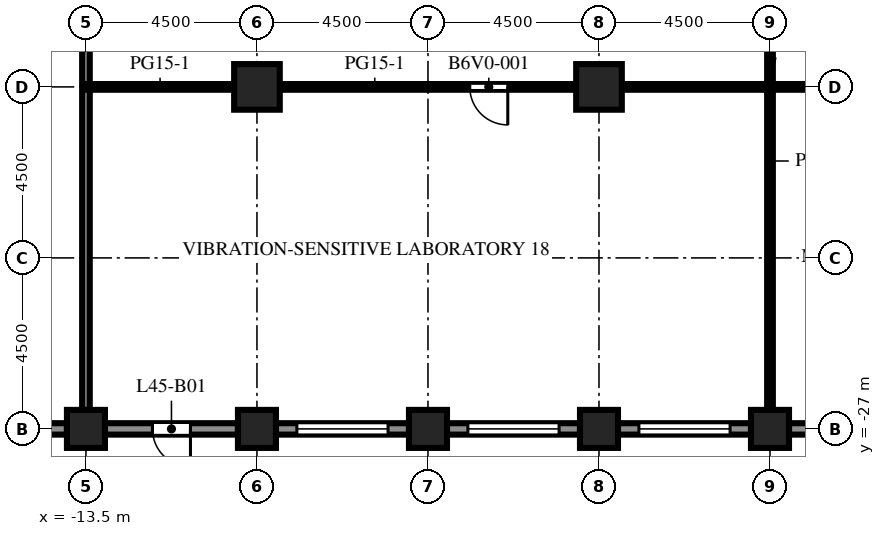
"""IFC4 building model, lengths in metres.
Left out: names, types, materials, properties, quantities, classifications, styles, units other than length and angle.
Written with IfcOpenShell. Run it as: python <this file> out.ifc"""

import sys

from ifc_helpers import new_model, si_unit, direction, frame, frame_2d, origin, origin_2d, place, context, subcontext, project, spatial, rectangle, extrude, element, fill, save


model = new_model("IFC4")
c1 = context("Model", 3, precision=1e-05, world=origin(), true_north=direction((0.0, 1.0)))
c2 = subcontext(c1, "Body", "Model", "MODEL_VIEW")
j1 = project(units=[si_unit("LENGTHUNIT", "METRE"), si_unit("PLANEANGLEUNIT", "RADIAN")], contexts=[c1])
p1 = place(None, origin())
s1 = spatial("IfcSite", under=j1, at=p1, CompositionType="ELEMENT")
p2 = place(p1, origin())
s2 = spatial("IfcBuilding", under=s1, at=p2, CompositionType="ELEMENT")
p3 = place(p2, frame((0.0, 0.0, 199.7)))
s3 = spatial("IfcBuildingStorey", under=s2, at=p3, CompositionType="ELEMENT", Elevation=199.7)
for number, where, z_axis, x_axis in (
    (1, (-13.5, -27.0, 0.0), (0.0, 0.0, 1.0), (1.0, 0.0, 0.0)),
    (2, (-9.0, -27.0, 0.0), (0.0, 0.0, 1.0), (1.0, 0.0, 0.0)),
    (3, (-4.5, -27.0, 0.0), (0.0, 0.0, 1.0), (1.0, 0.0, 0.0)),
    (4, (0.0, -27.0, 0.0), (0.0, 0.0, 1.0), (1.0, 0.0, 0.0)),
    (5, (4.5, -27.0, 0.0), (0.0, 0.0, 1.0), (1.0, 0.0, 0.0)),
):
    element("IfcColumn", number, at=place(p3, frame(where, z_axis=z_axis, x_axis=x_axis)), inside=s3, PredefinedType="COLUMN", context=c2, shape_type="SweptSolid", body=[
        extrude(rectangle(XDim=1.0, YDim=1.0, at=origin_2d()), origin(), (0.0, 0.0, 1.0), 4.1),
    ])
for number, where, z_axis, x_axis in (
    (6, (-9.0, -18.0, 0.0), (0.0, 0.0, 1.0), (1.0, 0.0, 0.0)),
    (7, (0.0, -18.0, 0.0), (0.0, 0.0, 1.0), (1.0, 0.0, 0.0)),
):
    element("IfcColumn", number, at=place(p3, frame(where, z_axis=z_axis, x_axis=x_axis)), inside=s3, PredefinedType="COLUMN", context=c2, shape_type="SweptSolid", body=[
        extrude(rectangle(XDim=1.2, YDim=1.2, at=origin_2d()), origin(), (0.0, 0.0, 1.0), 4.1),
    ])
p4 = place(p3, frame((-14.0, -27.0, 0.0), z_axis=(0.0, 0.0, 1.0), x_axis=(-1.0, 0.0, 0.0)))
e8 = element("IfcWall", 8, at=p4, inside=s3, PredefinedType="SOLIDWALL", context=c2, shape_type="SweptSolid", body=[
    extrude(rectangle(XDim=3.5, YDim=0.3, at=frame_2d((1.75, 0.0))), origin(), (0.0, 0.0, 1.0), 2.85),
])
p5 = place(p4, frame((0.55, 0.0, 0.8)))
e9 = element("IfcOpeningElement", 9, at=p5, cuts=e8, PredefinedType="OPENING", context=c2, shape_type="SweptSolid", body=[
    extrude(rectangle(XDim=2.4, YDim=1.7, at=frame_2d((1.2, 0.85))), frame((0.0, 0.16, 0.0), z_axis=(0.0, -1.0, 0.0), x_axis=(1.0, 0.0, 0.0)), (0.0, 0.0, 1.0), 0.32),
])
p6 = place(p3, frame((-9.5, -27.0, 0.0), z_axis=(0.0, 0.0, 1.0), x_axis=(-1.0, 0.0, 0.0)))
e10 = element("IfcWall", 10, at=p6, inside=s3, PredefinedType="SOLIDWALL", context=c2, shape_type="SweptSolid", body=[
    extrude(rectangle(XDim=3.5, YDim=0.3, at=frame_2d((1.75, 0.0))), origin(), (0.0, 0.0, 1.0), 2.85),
])
p7 = place(p6, frame((1.25, 0.0, 0.0)))
e11 = element("IfcOpeningElement", 11, at=p7, cuts=e10, PredefinedType="OPENING", context=c2, shape_type="SweptSolid", body=[
    extrude(rectangle(XDim=1.0, YDim=2.2, at=frame_2d((0.5, 1.1))), frame((0.0, 0.16, 0.0), z_axis=(0.0, -1.0, 0.0), x_axis=(1.0, 0.0, 0.0)), (0.0, 0.0, 1.0), 0.32),
])
p8 = place(p3, frame((-5.0, -27.0, 0.0), z_axis=(0.0, 0.0, 1.0), x_axis=(-1.0, 0.0, 0.0)))
e12 = element("IfcWall", 12, at=p8, inside=s3, PredefinedType="SOLIDWALL", context=c2, shape_type="SweptSolid", body=[
    extrude(rectangle(XDim=3.5, YDim=0.3, at=frame_2d((1.75, 0.0))), origin(), (0.0, 0.0, 1.0), 2.85),
])
p9 = place(p8, frame((0.55, 0.0, 0.8)))
e13 = element("IfcOpeningElement", 13, at=p9, cuts=e12, PredefinedType="OPENING", context=c2, shape_type="SweptSolid", body=[
    extrude(rectangle(XDim=2.4, YDim=1.7, at=frame_2d((1.2, 0.85))), frame((0.0, 0.16, 0.0), z_axis=(0.0, -1.0, 0.0), x_axis=(1.0, 0.0, 0.0)), (0.0, 0.0, 1.0), 0.32),
])
p10 = place(p3, frame((-0.5, -27.0, 0.0), z_axis=(0.0, 0.0, 1.0), x_axis=(-1.0, 0.0, 0.0)))
e14 = element("IfcWall", 14, at=p10, inside=s3, PredefinedType="SOLIDWALL", context=c2, shape_type="SweptSolid", body=[
    extrude(rectangle(XDim=3.5, YDim=0.3, at=frame_2d((1.75, 0.0))), origin(), (0.0, 0.0, 1.0), 2.85),
])
p11 = place(p10, frame((0.55, 0.0, 0.8)))
e15 = element("IfcOpeningElement", 15, at=p11, cuts=e14, PredefinedType="OPENING", context=c2, shape_type="SweptSolid", body=[
    extrude(rectangle(XDim=2.4, YDim=1.7, at=frame_2d((1.2, 0.85))), frame((0.0, 0.16, 0.0), z_axis=(0.0, -1.0, 0.0), x_axis=(1.0, 0.0, 0.0)), (0.0, 0.0, 1.0), 0.32),
])
p12 = place(p3, frame((4.0, -27.0, 0.0), z_axis=(0.0, 0.0, 1.0), x_axis=(-1.0, 0.0, 0.0)))
e16 = element("IfcWall", 16, at=p12, inside=s3, PredefinedType="SOLIDWALL", context=c2, shape_type="SweptSolid", body=[
    extrude(rectangle(XDim=3.5, YDim=0.3, at=frame_2d((1.75, 0.0))), origin(), (0.0, 0.0, 1.0), 2.85),
])
p13 = place(p12, frame((0.55, 0.0, 0.8)))
e17 = element("IfcOpeningElement", 17, at=p13, cuts=e16, PredefinedType="OPENING", context=c2, shape_type="SweptSolid", body=[
    extrude(rectangle(XDim=2.4, YDim=1.7, at=frame_2d((1.2, 0.85))), frame((0.0, 0.16, 0.0), z_axis=(0.0, -1.0, 0.0), x_axis=(1.0, 0.0, 0.0)), (0.0, 0.0, 1.0), 0.32),
])
p14 = place(p3, frame((8.5, -27.0, 0.0), z_axis=(0.0, 0.0, 1.0), x_axis=(-1.0, 0.0, 0.0)))
e18 = element("IfcWall", 18, at=p14, inside=s3, PredefinedType="SOLIDWALL", context=c2, shape_type="SweptSolid", body=[
    extrude(rectangle(XDim=3.5, YDim=0.3, at=frame_2d((1.75, 0.0))), origin(), (0.0, 0.0, 1.0), 2.85),
])
p15 = place(p14, frame((0.55, 0.0, 0.8)))
e19 = element("IfcOpeningElement", 19, at=p15, cuts=e18, PredefinedType="OPENING", context=c2, shape_type="SweptSolid", body=[
    extrude(rectangle(XDim=2.4, YDim=1.7, at=frame_2d((1.2, 0.85))), frame((0.0, 0.16, 0.0), z_axis=(0.0, -1.0, 0.0), x_axis=(1.0, 0.0, 0.0)), (0.0, 0.0, 1.0), 0.32),
])
p16 = place(p3, frame((-13.5, -26.5, 0.0), z_axis=(0.0, 0.0, 1.0), x_axis=(0.0, 1.0, 0.0)))
e20 = element("IfcWall", 20, at=p16, inside=s3, PredefinedType="PARTITIONING", context=c2, shape_type="SweptSolid", body=[
    extrude(rectangle(XDim=29.75, YDim=0.2, at=frame_2d((14.875, 0.0))), origin(), (0.0, 0.0, 1.0), 3.65),
])
p17 = place(p16, frame((23.85, 0.0, 0.0)))
e21 = element("IfcOpeningElement", 21, at=p17, cuts=e20, PredefinedType="OPENING", context=c2, shape_type="SweptSolid", body=[
    extrude(rectangle(XDim=1.0, YDim=2.1, at=frame_2d((0.5, 1.05))), frame((0.0, 0.11, 0.0), z_axis=(0.0, -1.0, 0.0), x_axis=(1.0, 0.0, 0.0)), (0.0, 0.0, 1.0), 0.22),
])
p18 = place(p3, frame((4.5, -9.0, 0.0), z_axis=(0.0, 0.0, 1.0), x_axis=(0.0, -1.0, 0.0)))
e22 = element("IfcWall", 22, at=p18, inside=s3, PredefinedType="PARTITIONING", context=c2, shape_type="SweptSolid", body=[
    extrude(rectangle(XDim=17.5, YDim=0.15, at=frame_2d((8.75, 0.0))), origin(), (0.0, 0.0, 1.0), 3.65),
])
p19 = place(p18, frame((3.4, 0.0, 0.0)))
e23 = element("IfcOpeningElement", 23, at=p19, cuts=e22, PredefinedType="OPENING", context=c2, shape_type="SweptSolid", body=[
    extrude(rectangle(XDim=1.0, YDim=2.1, at=frame_2d((0.5, 1.05))), frame((0.0, 0.085, 0.0), z_axis=(0.0, -1.0, 0.0), x_axis=(1.0, 0.0, 0.0)), (0.0, 0.0, 1.0), 0.17),
])
p20 = place(p3, frame((-13.5, -18.0, 0.0), z_axis=(0.0, 0.0, 1.0), x_axis=(1.0, 0.0, 0.0)))
e24 = element("IfcWall", 24, at=p20, inside=s3, PredefinedType="PARTITIONING", context=c2, shape_type="SweptSolid", body=[
    extrude(rectangle(XDim=3.9, YDim=0.15, at=frame_2d((1.95, 0.0))), origin(), (0.0, 0.0, 1.0), 3.65),
])
p21 = place(p3, frame((-0.6, -18.0, 0.0), z_axis=(0.0, 0.0, 1.0), x_axis=(-1.0, 0.0, 0.0)))
e25 = element("IfcWall", 25, at=p21, inside=s3, PredefinedType="PARTITIONING", context=c2, shape_type="SweptSolid", body=[
    extrude(rectangle(XDim=7.8, YDim=0.15, at=frame_2d((3.9, 0.0))), origin(), (0.0, 0.0, 1.0), 3.65),
])
p22 = place(p21, frame((1.8, 0.0, 0.0)))
e26 = element("IfcOpeningElement", 26, at=p22, cuts=e25, PredefinedType="OPENING", context=c2, shape_type="SweptSolid", body=[
    extrude(rectangle(XDim=1.0, YDim=2.1, at=frame_2d((0.5, 1.05))), frame((0.0, 0.085, 0.0), z_axis=(0.0, -1.0, 0.0), x_axis=(1.0, 0.0, 0.0)), (0.0, 0.0, 1.0), 0.17),
])
p23 = place(p3, frame((0.6, -18.0, 0.0), z_axis=(0.0, 0.0, 1.0), x_axis=(1.0, 0.0, 0.0)))
e27 = element("IfcWall", 27, at=p23, inside=s3, PredefinedType="PARTITIONING", context=c2, shape_type="SweptSolid", body=[
    extrude(rectangle(XDim=7.8, YDim=0.15, at=frame_2d((3.9, 0.0))), origin(), (0.0, 0.0, 1.0), 3.65),
])
p24 = place(p7, origin())
e28 = element("IfcDoor", 28, at=p24, inside=s3, OperationType="SINGLE_SWING_LEFT", PredefinedType="DOOR", context=c2, shape_type="SweptSolid", body=[
    extrude(rectangle(XDim=1.0, YDim=2.2, at=frame_2d((0.5, 1.1))), frame((0.0, 0.025, 0.0), z_axis=(0.0, -1.0, 0.0), x_axis=(1.0, 0.0, 0.0)), (0.0, 0.0, 1.0), 0.05),
])
fill(e11, e28)
p25 = place(p9, origin())
e29 = element("IfcWindow", 29, at=p25, inside=s3, PartitioningType="SINGLE_PANEL", PredefinedType="WINDOW", context=c2, shape_type="SweptSolid", body=[
    extrude(rectangle(XDim=2.4, YDim=1.7, at=frame_2d((1.2, 0.85))), frame((0.0, 0.03, 0.0), z_axis=(0.0, -1.0, 0.0), x_axis=(1.0, 0.0, 0.0)), (0.0, 0.0, 1.0), 0.06),
])
fill(e13, e29)
p26 = place(p11, origin())
e30 = element("IfcWindow", 30, at=p26, inside=s3, PartitioningType="SINGLE_PANEL", PredefinedType="WINDOW", context=c2, shape_type="SweptSolid", body=[
    extrude(rectangle(XDim=2.4, YDim=1.7, at=frame_2d((1.2, 0.85))), frame((0.0, 0.03, 0.0), z_axis=(0.0, -1.0, 0.0), x_axis=(1.0, 0.0, 0.0)), (0.0, 0.0, 1.0), 0.06),
])
fill(e15, e30)
p27 = place(p13, origin())
e31 = element("IfcWindow", 31, at=p27, inside=s3, PartitioningType="SINGLE_PANEL", PredefinedType="WINDOW", context=c2, shape_type="SweptSolid", body=[
    extrude(rectangle(XDim=2.4, YDim=1.7, at=frame_2d((1.2, 0.85))), frame((0.0, 0.03, 0.0), z_axis=(0.0, -1.0, 0.0), x_axis=(1.0, 0.0, 0.0)), (0.0, 0.0, 1.0), 0.06),
])
fill(e17, e31)
p28 = place(p22, origin())
e32 = element("IfcDoor", 32, at=p28, inside=s3, OperationType="SINGLE_SWING_LEFT", PredefinedType="DOOR", context=c2, shape_type="SweptSolid", body=[
    extrude(rectangle(XDim=1.0, YDim=2.1, at=frame_2d((0.5, 1.05))), frame((0.0, 0.025, 0.0), z_axis=(0.0, -1.0, 0.0), x_axis=(1.0, 0.0, 0.0)), (0.0, 0.0, 1.0), 0.05),
])
fill(e26, e32)
save(model, sys.argv[1])
